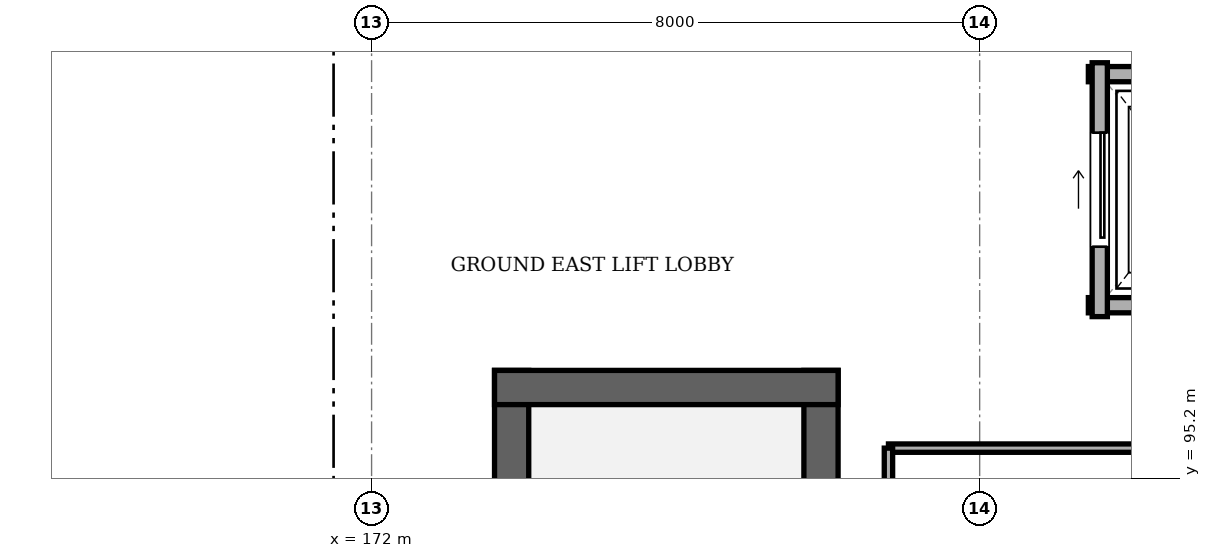
"""IFC4 building model, lengths in metres.
Left out: names, types, materials, properties, quantities, classifications, styles, units other than length and angle.
Written with IfcOpenShell. Run it as: python <this file> out.ifc"""

import sys

from ifc_helpers import new_model, si_unit, direction, frame, frame_2d, origin, place, context, subcontext, project, spatial, rectangle, extrude, element, fill, save


model = new_model("IFC4")
c1 = context("Model", 3, precision=1e-05, world=origin(), true_north=direction((0.0, 1.0)))
c2 = subcontext(c1, "Body", "Model", "MODEL_VIEW")
j1 = project(units=[si_unit("LENGTHUNIT", "METRE"), si_unit("PLANEANGLEUNIT", "RADIAN")], contexts=[c1])
p1 = place(None, origin())
s1 = spatial("IfcSite", under=j1, at=p1, CompositionType="ELEMENT")
p2 = place(p1, origin())
s2 = spatial("IfcBuilding", under=s1, at=p2, CompositionType="ELEMENT")
p3 = place(p2, origin())
s3 = spatial("IfcBuildingStorey", under=s2, at=p3, CompositionType="ELEMENT", Elevation=0.0)
for number, where, z_axis, x_axis in (
    (1, (177.913, 85.925, 0.0), (0.0, 0.0, 1.0), (0.0, 1.0, 0.0)),
    (2, (173.843, 96.623, 0.0), (0.0, 0.0, 1.0), (0.0, -1.0, 0.0)),
):
    element("IfcWall", number, at=place(p3, frame(where, z_axis=z_axis, x_axis=x_axis)), inside=s3, PredefinedType="SHEAR", context=c2, shape_type="SweptSolid", body=[
        extrude(rectangle(XDim=10.698, YDim=0.45, at=frame_2d((5.349, 0.0))), origin(), (0.0, 0.0, 1.0), 6.36),
    ])
p4 = place(p3, frame((178.137, 96.397, 0.0), z_axis=(0.0, 0.0, 1.0), x_axis=(-1.0, 0.0, 0.0)))
e3 = element("IfcWall", 3, at=p4, inside=s3, PredefinedType="SHEAR", context=c2, shape_type="SweptSolid", body=[
    extrude(rectangle(XDim=4.52, YDim=0.45, at=frame_2d((2.26, 0.0))), origin(), (0.0, 0.0, 1.0), 6.36),
])
for number, where, z_axis, x_axis in (
    (4, (181.43, 97.48, 0.0), (0.0, 0.0, 1.0), (1.0, 0.0, 0.0)),
    (5, (184.17, 100.52, 0.0), (0.0, 0.0, 1.0), (-1.0, 0.0, 0.0)),
):
    element("IfcWall", number, at=place(p3, frame(where, z_axis=z_axis, x_axis=x_axis)), inside=s3, PredefinedType="SOLIDWALL", context=c2, shape_type="SweptSolid", body=[
        extrude(rectangle(XDim=2.74, YDim=0.2, at=frame_2d((1.37, 0.0))), origin(), (0.0, 0.0, 1.0), 4.4),
    ])
p5 = place(p3, frame((181.58, 100.67, 0.0), z_axis=(0.0, 0.0, 1.0), x_axis=(0.0, -1.0, 0.0)))
e6 = element("IfcWall", 6, at=p5, inside=s3, PredefinedType="SOLIDWALL", context=c2, shape_type="SweptSolid", body=[
    extrude(rectangle(XDim=3.34, YDim=0.2, at=frame_2d((1.67, 0.0))), origin(), (0.0, 0.0, 1.0), 4.4),
])
p6 = place(p5, frame((0.92, 0.0, 0.0)))
e7 = element("IfcOpeningElement", 7, at=p6, cuts=e6, PredefinedType="OPENING", context=c2, shape_type="SweptSolid", body=[
    extrude(rectangle(XDim=1.5, YDim=2.2, at=frame_2d((0.75, 1.1))), frame((0.0, 0.11, 0.0), z_axis=(0.0, -1.0, 0.0), x_axis=(1.0, 0.0, 0.0)), (0.0, 0.0, 1.0), 0.22),
])
p7 = place(p3, frame((178.8, 95.6, 0.0), z_axis=(0.0, 0.0, 1.0), x_axis=(1.0, 0.0, 0.0)))
e8 = element("IfcWall", 8, at=p7, inside=s3, PredefinedType="PARTITIONING", context=c2, shape_type="SweptSolid", body=[
    extrude(rectangle(XDim=8.4, YDim=0.11, at=frame_2d((4.2, 0.0))), origin(), (0.0, 0.0, 1.0), 4.4),
])
p8 = place(p7, frame((3.625, 0.0, 0.0)))
e9 = element("IfcOpeningElement", 9, at=p8, cuts=e8, PredefinedType="OPENING", context=c2, shape_type="SweptSolid", body=[
    extrude(rectangle(XDim=1.15, YDim=2.1, at=frame_2d((0.575, 1.05))), frame((0.0, 0.065, 0.0), z_axis=(0.0, -1.0, 0.0), x_axis=(1.0, 0.0, 0.0)), (0.0, 0.0, 1.0), 0.13),
])
p9 = place(p3, frame((178.8, 86.4, 0.0), z_axis=(0.0, 0.0, 1.0), x_axis=(0.0, 1.0, 0.0)))
e10 = element("IfcWall", 10, at=p9, inside=s3, PredefinedType="PARTITIONING", context=c2, shape_type="SweptSolid", body=[
    extrude(rectangle(XDim=9.2, YDim=0.11, at=frame_2d((4.6, 0.0))), origin(), (0.0, 0.0, 1.0), 4.4),
])
p10 = place(p6, origin())
e11 = element("IfcDoor", 11, at=p10, inside=s3, OperationType="SLIDING_TO_LEFT", PredefinedType="DOOR", context=c2, shape_type="SweptSolid", body=[
    extrude(rectangle(XDim=1.5, YDim=2.2, at=frame_2d((0.75, 1.1))), frame((0.0, 0.025, 0.0), z_axis=(0.0, -1.0, 0.0), x_axis=(1.0, 0.0, 0.0)), (0.0, 0.0, 1.0), 0.05),
])
fill(e7, e11)
save(model, sys.argv[1])
